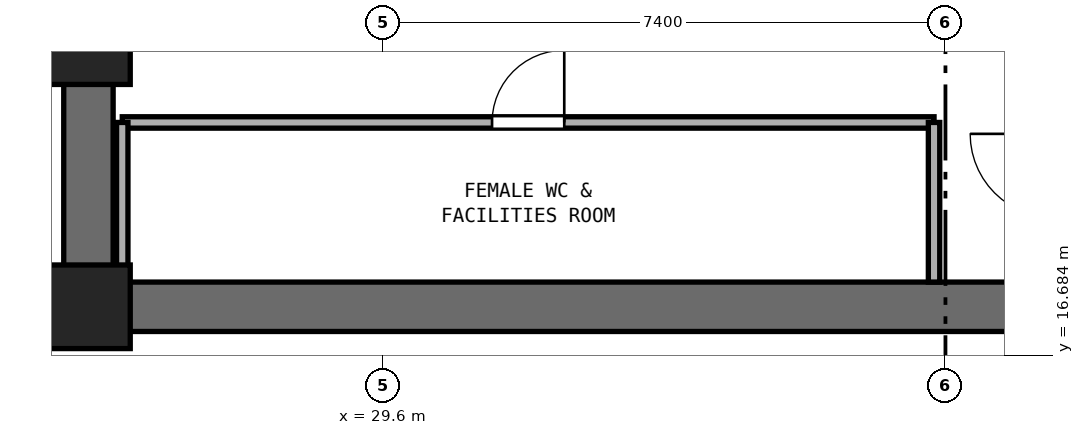
"""IFC4 building model, lengths in metres.
Left out: names, types, materials, properties, quantities, classifications, styles, units other than length and angle.
Written with IfcOpenShell. Run it as: python <this file> out.ifc"""

import sys

from ifc_helpers import new_model, si_unit, direction, frame, frame_2d, origin, origin_2d, place, context, subcontext, project, spatial, rectangle, extrude, element, fill, save


model = new_model("IFC4")
c1 = context("Model", 3, precision=1e-05, world=origin(), true_north=direction((0.0, 1.0)))
c2 = subcontext(c1, "Body", "Model", "MODEL_VIEW")
j1 = project(units=[si_unit("LENGTHUNIT", "METRE"), si_unit("PLANEANGLEUNIT", "RADIAN")], contexts=[c1])
p1 = place(None, origin())
s1 = spatial("IfcSite", under=j1, at=p1, CompositionType="ELEMENT")
p2 = place(p1, origin())
s2 = spatial("IfcBuilding", under=s1, at=p2, CompositionType="ELEMENT")
p3 = place(p2, frame((0.0, 0.0, 63.0)))
s3 = spatial("IfcBuildingStorey", under=s2, at=p3, CompositionType="ELEMENT", Elevation=63.0)
p4 = place(p3, frame((25.4, 17.325, 0.0), z_axis=(0.0, 0.0, 1.0), x_axis=(1.0, 0.0, 0.0)))
e1 = element("IfcWall", 1, at=p4, inside=s3, PredefinedType="SHEAR", context=c2, shape_type="SweptSolid", body=[
    extrude(rectangle(XDim=23.2, YDim=0.65, at=frame_2d((11.6, 0.0))), origin(), (0.0, 0.0, 1.0), 3.525),
])
p5 = place(p3, frame((25.725, 17.65, 0.0), z_axis=(0.0, 0.0, 1.0), x_axis=(0.0, 1.0, 0.0)))
e2 = element("IfcWall", 2, at=p5, inside=s3, PredefinedType="SHEAR", context=c2, shape_type="SweptSolid", body=[
    extrude(rectangle(XDim=15.1, YDim=0.65, at=frame_2d((7.55, 0.0))), origin(), (0.0, 0.0, 1.0), 3.525),
])
p6 = place(p5, frame((6.8, 0.0, 0.0)))
e3 = element("IfcOpeningElement", 3, at=p6, cuts=e2, PredefinedType="OPENING", context=c2, shape_type="SweptSolid", body=[
    extrude(rectangle(XDim=1.5, YDim=2.15, at=frame_2d((0.75, 1.075))), frame((0.0, 0.335, 0.0), z_axis=(0.0, -1.0, 0.0), x_axis=(1.0, 0.0, 0.0)), (0.0, 0.0, 1.0), 0.67),
])
for number, where, z_axis, x_axis in (
    (4, (25.725, 17.325, 0.0), (0.0, 0.0, 1.0), (1.0, 0.0, 0.0)),
    (5, (25.725, 20.8, 0.0), (0.0, 0.0, 1.0), (1.0, 0.0, 0.0)),
):
    element("IfcColumn", number, at=place(p3, frame(where, z_axis=z_axis, x_axis=x_axis)), inside=s3, PredefinedType="PILASTER", context=c2, shape_type="SweptSolid", body=[
        extrude(rectangle(XDim=1.1, YDim=1.1, at=origin_2d()), origin(), (0.0, 0.0, 1.0), 3.8),
    ])
p7 = place(p3, frame((26.17, 19.75, 0.0), z_axis=(0.0, 0.0, 1.0), x_axis=(1.0, 0.0, 0.0)))
e6 = element("IfcWall", 6, at=p7, inside=s3, PredefinedType="PARTITIONING", context=c2, shape_type="SweptSolid", body=[
    extrude(rectangle(XDim=10.68, YDim=0.15, at=frame_2d((5.34, 0.0))), origin(), (0.0, 0.0, 1.0), 3.525),
])
p8 = place(p7, frame((4.865, 0.0, 0.0)))
e7 = element("IfcOpeningElement", 7, at=p8, cuts=e6, PredefinedType="OPENING", context=c2, shape_type="SweptSolid", body=[
    extrude(rectangle(XDim=0.95, YDim=2.1, at=frame_2d((0.475, 1.05))), frame((0.0, 0.085, 0.0), z_axis=(0.0, -1.0, 0.0), x_axis=(1.0, 0.0, 0.0)), (0.0, 0.0, 1.0), 0.17),
])
for number, where, z_axis, x_axis in (
    (8, (26.17, 17.65, 0.0), (0.0, 0.0, 1.0), (0.0, 1.0, 0.0)),
    (9, (36.85, 17.65, 0.0), (0.0, 0.0, 1.0), (0.0, 1.0, 0.0)),
):
    element("IfcWall", number, at=place(p3, frame(where, z_axis=z_axis, x_axis=x_axis)), inside=s3, PredefinedType="PARTITIONING", context=c2, shape_type="SweptSolid", body=[
        extrude(rectangle(XDim=2.1, YDim=0.15, at=frame_2d((1.05, 0.0))), origin(), (0.0, 0.0, 1.0), 3.525),
    ])
p9 = place(p8, origin())
e10 = element("IfcDoor", 10, at=p9, inside=s3, OperationType="SINGLE_SWING_RIGHT", PredefinedType="DOOR", context=c2, shape_type="SweptSolid", body=[
    extrude(rectangle(XDim=0.95, YDim=2.1, at=frame_2d((0.475, 1.05))), frame((0.0, 0.025, 0.0), z_axis=(0.0, -1.0, 0.0), x_axis=(1.0, 0.0, 0.0)), (0.0, 0.0, 1.0), 0.05),
])
fill(e7, e10)
save(model, sys.argv[1])
